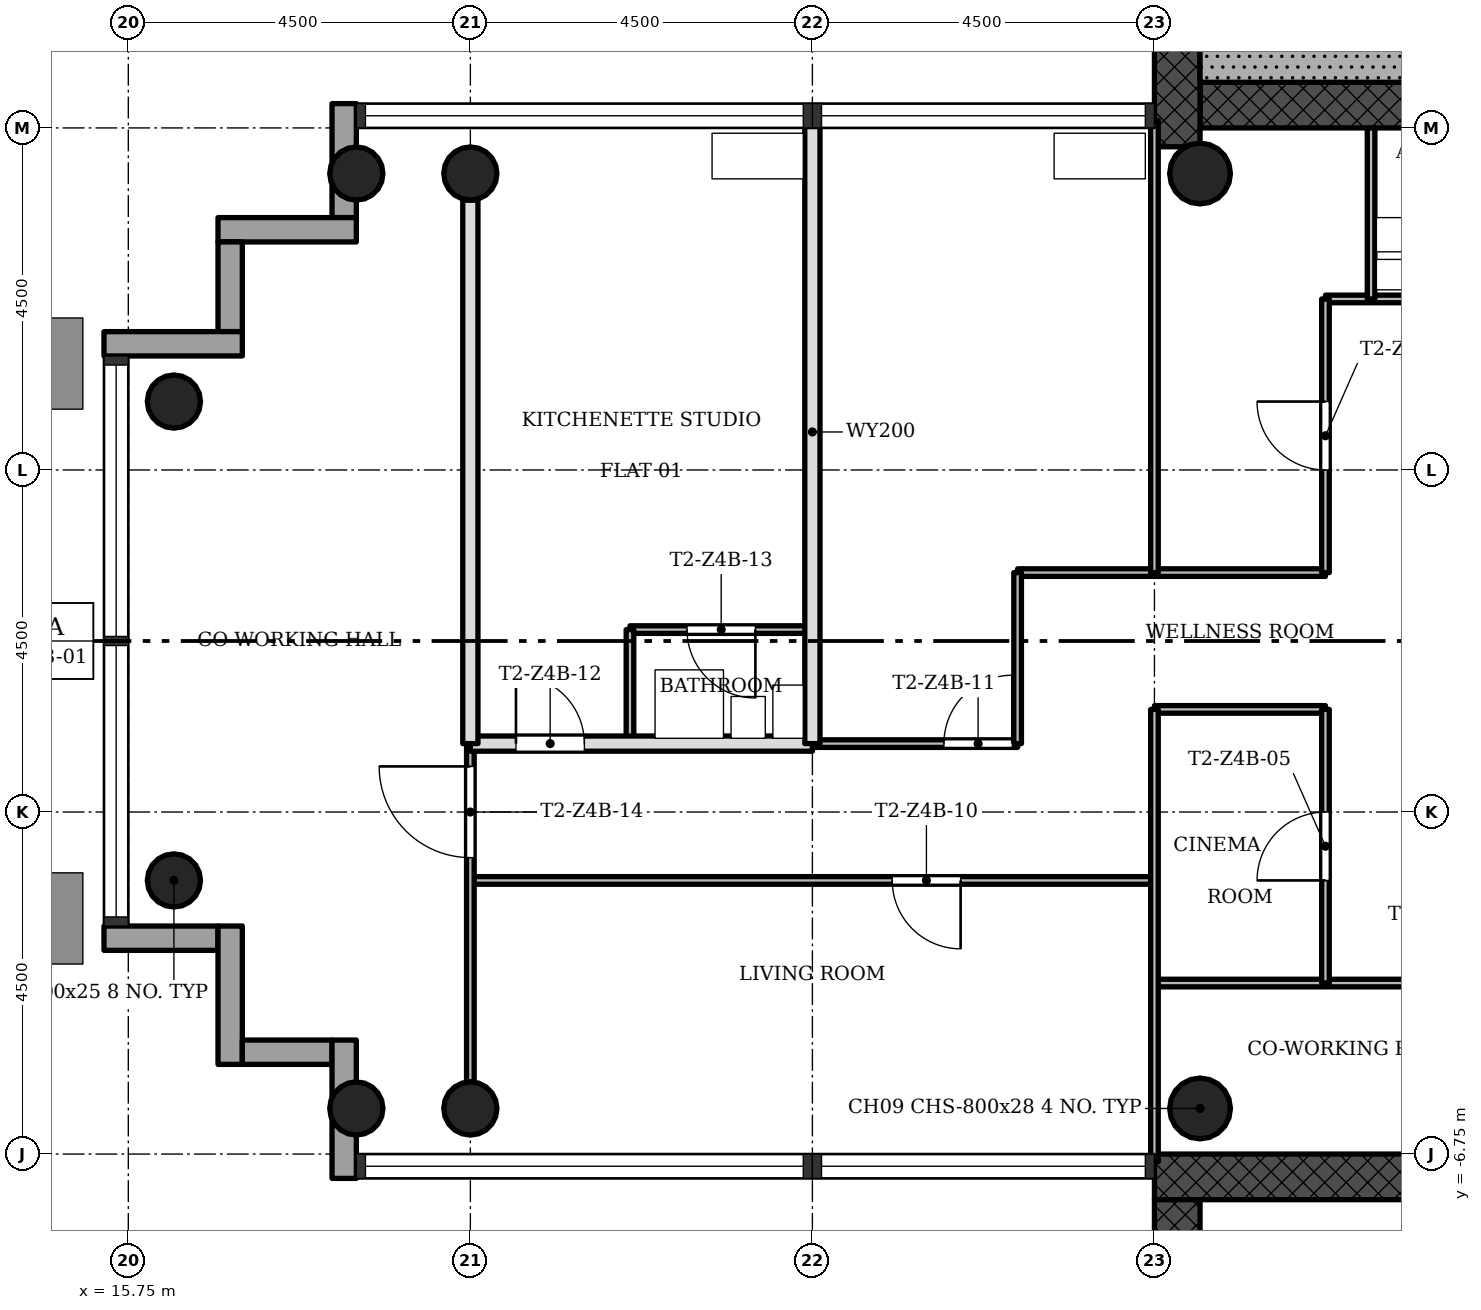
"""IFC4 building model, lengths in metres.
Left out: names, types, materials, properties, quantities, classifications, styles, units other than length and angle.
Written with IfcOpenShell. Run it as: python <this file> out.ifc"""

import sys

from ifc_helpers import new_model, si_unit, direction, frame, frame_2d, origin, origin_2d, place, context, subcontext, project, spatial, rectangle, hollow_circle, extrude, element, fill, save


model = new_model("IFC4")
c1 = context("Model", 3, precision=1e-05, world=origin(), true_north=direction((0.0, 1.0)))
c2 = subcontext(c1, "Body", "Model", "MODEL_VIEW")
j1 = project(units=[si_unit("LENGTHUNIT", "METRE"), si_unit("PLANEANGLEUNIT", "RADIAN")], contexts=[c1])
p1 = place(None, origin())
s1 = spatial("IfcSite", under=j1, at=p1, CompositionType="ELEMENT")
p2 = place(p1, origin())
s2 = spatial("IfcBuilding", under=s1, at=p2, CompositionType="ELEMENT")
p3 = place(p2, frame((0.0, 0.0, 230.0)))
s3 = spatial("IfcBuildingStorey", under=s2, at=p3, CompositionType="ELEMENT", Elevation=230.0)
p4 = place(p3, frame((29.85, 7.05, 0.0), z_axis=(0.0, 0.0, 1.0), x_axis=(1.0, 0.0, 0.0)))
e1 = element("IfcWall", 1, at=p4, inside=s3, PredefinedType="SHEAR", context=c2, shape_type="SweptSolid", body=[
    extrude(rectangle(XDim=12.9, YDim=0.6, at=frame_2d((6.45, 0.0))), origin(), (0.0, 0.0, 1.0), 3.4),
])
p5 = place(p4, frame((5.25, 0.0, 0.0)))
e2 = element("IfcOpeningElement", 2, at=p5, cuts=e1, PredefinedType="OPENING", context=c2, shape_type="SweptSolid", body=[
    extrude(rectangle(XDim=1.8, YDim=2.1, at=frame_2d((0.9, 1.05))), frame((0.0, 0.31, 0.0), z_axis=(0.0, -1.0, 0.0), x_axis=(1.0, 0.0, 0.0)), (0.0, 0.0, 1.0), 0.62),
])
p6 = place(p3, frame((29.55, 15.15, 0.0), z_axis=(0.0, 0.0, 1.0), x_axis=(0.0, -1.0, 0.0)))
e3 = element("IfcWall", 3, at=p6, inside=s3, PredefinedType="SHEAR", context=c2, shape_type="SweptSolid", body=[
    extrude(rectangle(XDim=8.648, YDim=0.6, at=frame_2d((4.324, 0.0))), origin(), (0.0, 0.0, 1.0), 3.4),
])
p7 = place(p3, frame((42.15, -7.05, 0.0), z_axis=(0.0, 0.0, 1.0), x_axis=(-1.0, 0.0, 0.0)))
e4 = element("IfcWall", 4, at=p7, inside=s3, PredefinedType="SHEAR", context=c2, shape_type="SweptSolid", body=[
    extrude(rectangle(XDim=12.9, YDim=0.6, at=frame_2d((6.45, 0.0))), origin(), (0.0, 0.0, 1.0), 3.4),
])
p8 = place(p7, frame((5.25, 0.0, 0.0)))
e5 = element("IfcOpeningElement", 5, at=p8, cuts=e4, PredefinedType="OPENING", context=c2, shape_type="SweptSolid", body=[
    extrude(rectangle(XDim=1.8, YDim=2.1, at=frame_2d((0.9, 1.05))), frame((0.0, 0.31, 0.0), z_axis=(0.0, -1.0, 0.0), x_axis=(1.0, 0.0, 0.0)), (0.0, 0.0, 1.0), 0.62),
])
p9 = place(p3, frame((29.55, -7.35, 0.0), z_axis=(0.0, 0.0, 1.0), x_axis=(0.0, -1.0, 0.0)))
e6 = element("IfcWall", 6, at=p9, inside=s3, PredefinedType="SHEAR", context=c2, shape_type="SweptSolid", body=[
    extrude(rectangle(XDim=8.4, YDim=0.6, at=frame_2d((4.2, 0.0))), origin(), (0.0, 0.0, 1.0), 3.4),
])
for number, where, z_axis, x_axis in (
    (7, (20.25, 6.15, 0.0), (0.0, 0.0, 1.0), (1.0, 0.0, 0.0)),
    (8, (20.25, -6.15, 0.0), (0.0, 0.0, 1.0), (1.0, 0.0, 0.0)),
    (9, (18.75, 6.15, 0.0), (0.0, 0.0, 1.0), (1.0, 0.0, 0.0)),
    (10, (18.75, -6.15, 0.0), (0.0, 0.0, 1.0), (1.0, 0.0, 0.0)),
    (11, (16.35, 3.15, 0.0), (0.0, 0.0, 1.0), (1.0, 0.0, 0.0)),
    (12, (16.35, -3.15, 0.0), (0.0, 0.0, 1.0), (1.0, 0.0, 0.0)),
):
    element("IfcColumn", number, at=place(p3, frame(where, z_axis=z_axis, x_axis=x_axis)), inside=s3, PredefinedType="COLUMN", context=c2, shape_type="SweptSolid", body=[
        extrude(hollow_circle(Radius=0.35, WallThickness=0.025, at=origin_2d()), origin(), (0.0, 0.0, 1.0), 3.4),
    ])
for number, where, z_axis, x_axis in (
    (13, (29.85, 6.15, 0.0), (0.0, 0.0, 1.0), (1.0, 0.0, 0.0)),
    (14, (29.85, -6.15, 0.0), (0.0, 0.0, 1.0), (1.0, 0.0, 0.0)),
):
    element("IfcColumn", number, at=place(p3, frame(where, z_axis=z_axis, x_axis=x_axis)), inside=s3, PredefinedType="COLUMN", context=c2, shape_type="SweptSolid", body=[
        extrude(hollow_circle(Radius=0.4, WallThickness=0.028, at=origin_2d()), origin(), (0.0, 0.0, 1.0), 3.4),
    ])
p10 = place(p3, frame((18.59, 7.07, -0.3), z_axis=(0.0, 0.0, 1.0), x_axis=(0.0, -1.0, 0.0)))
e15 = element("IfcWall", 15, at=p10, inside=s3, PredefinedType="STANDARD", context=c2, shape_type="SweptSolid", body=[
    extrude(rectangle(XDim=1.5, YDim=0.32, at=frame_2d((0.75, 0.0))), origin(), (0.0, 0.0, 1.0), 3.4),
])
p11 = place(p3, frame((18.75, 5.41, -0.3), z_axis=(0.0, 0.0, 1.0), x_axis=(-1.0, 0.0, 0.0)))
e16 = element("IfcWall", 16, at=p11, inside=s3, PredefinedType="STANDARD", context=c2, shape_type="SweptSolid", body=[
    extrude(rectangle(XDim=1.82, YDim=0.32, at=frame_2d((0.91, 0.0))), origin(), (0.0, 0.0, 1.0), 3.4),
])
p12 = place(p3, frame((17.09, 5.25, -0.3), z_axis=(0.0, 0.0, 1.0), x_axis=(0.0, -1.0, 0.0)))
e17 = element("IfcWall", 17, at=p12, inside=s3, PredefinedType="STANDARD", context=c2, shape_type="SweptSolid", body=[
    extrude(rectangle(XDim=1.18, YDim=0.32, at=frame_2d((0.59, 0.0))), origin(), (0.0, 0.0, 1.0), 3.4),
])
p13 = place(p3, frame((17.25, 3.91, -0.3), z_axis=(0.0, 0.0, 1.0), x_axis=(-1.0, 0.0, 0.0)))
e18 = element("IfcWall", 18, at=p13, inside=s3, PredefinedType="STANDARD", context=c2, shape_type="SweptSolid", body=[
    extrude(rectangle(XDim=1.82, YDim=0.32, at=frame_2d((0.91, 0.0))), origin(), (0.0, 0.0, 1.0), 3.4),
])
p14 = place(p3, frame((15.43, -3.91, -0.3), z_axis=(0.0, 0.0, 1.0), x_axis=(1.0, 0.0, 0.0)))
e19 = element("IfcWall", 19, at=p14, inside=s3, PredefinedType="STANDARD", context=c2, shape_type="SweptSolid", body=[
    extrude(rectangle(XDim=1.5, YDim=0.32, at=frame_2d((0.75, 0.0))), origin(), (0.0, 0.0, 1.0), 3.4),
])
p15 = place(p3, frame((17.09, -3.75, -0.3), z_axis=(0.0, 0.0, 1.0), x_axis=(0.0, -1.0, 0.0)))
e20 = element("IfcWall", 20, at=p15, inside=s3, PredefinedType="STANDARD", context=c2, shape_type="SweptSolid", body=[
    extrude(rectangle(XDim=1.82, YDim=0.32, at=frame_2d((0.91, 0.0))), origin(), (0.0, 0.0, 1.0), 3.4),
])
p16 = place(p3, frame((17.25, -5.41, -0.3), z_axis=(0.0, 0.0, 1.0), x_axis=(1.0, 0.0, 0.0)))
e21 = element("IfcWall", 21, at=p16, inside=s3, PredefinedType="STANDARD", context=c2, shape_type="SweptSolid", body=[
    extrude(rectangle(XDim=1.18, YDim=0.32, at=frame_2d((0.59, 0.0))), origin(), (0.0, 0.0, 1.0), 3.4),
])
p17 = place(p3, frame((18.59, -5.25, -0.3), z_axis=(0.0, 0.0, 1.0), x_axis=(0.0, -1.0, 0.0)))
e22 = element("IfcWall", 22, at=p17, inside=s3, PredefinedType="STANDARD", context=c2, shape_type="SweptSolid", body=[
    extrude(rectangle(XDim=1.82, YDim=0.32, at=frame_2d((0.91, 0.0))), origin(), (0.0, 0.0, 1.0), 3.4),
])
p18 = place(p3, frame((34.5, -4.5, 0.0), z_axis=(0.0, 0.0, 1.0), x_axis=(-1.0, 0.0, 0.0)))
e23 = element("IfcWall", 23, at=p18, inside=s3, PredefinedType="PARTITIONING", context=c2, shape_type="SweptSolid", body=[
    extrude(rectangle(XDim=5.25, YDim=0.1, at=frame_2d((2.625, 0.0))), origin(), (0.0, 0.0, 1.0), 2.98),
])
p19 = place(p18, frame((1.05, 0.0, 0.0)))
e24 = element("IfcOpeningElement", 24, at=p19, cuts=e23, PredefinedType="OPENING", context=c2, shape_type="SweptSolid", body=[
    extrude(rectangle(XDim=0.9, YDim=2.1, at=frame_2d((0.45, 1.05))), frame((0.0, 0.06, 0.0), z_axis=(0.0, -1.0, 0.0), x_axis=(1.0, 0.0, 0.0)), (0.0, 0.0, 1.0), 0.12),
])
p20 = place(p3, frame((29.25, -3.15, 0.0), z_axis=(0.0, 0.0, 1.0), x_axis=(-1.0, 0.0, 0.0)))
e25 = element("IfcWall", 25, at=p20, inside=s3, PredefinedType="PARTITIONING", context=c2, shape_type="SweptSolid", body=[
    extrude(rectangle(XDim=9.0, YDim=0.1, at=frame_2d((4.5, 0.0))), origin(), (0.0, 0.0, 1.0), 2.98),
])
p21 = place(p20, frame((2.55, 0.0, 0.0)))
e26 = element("IfcOpeningElement", 26, at=p21, cuts=e25, PredefinedType="OPENING", context=c2, shape_type="SweptSolid", body=[
    extrude(rectangle(XDim=0.9, YDim=2.1, at=frame_2d((0.45, 1.05))), frame((0.0, 0.06, 0.0), z_axis=(0.0, -1.0, 0.0), x_axis=(1.0, 0.0, 0.0)), (0.0, 0.0, 1.0), 0.12),
])
p22 = place(p3, frame((27.45, -1.35, 0.0), z_axis=(0.0, 0.0, 1.0), x_axis=(-1.0, 0.0, 0.0)))
e27 = element("IfcWall", 27, at=p22, inside=s3, PredefinedType="PARTITIONING", context=c2, shape_type="SweptSolid", body=[
    extrude(rectangle(XDim=2.7, YDim=0.1, at=frame_2d((1.35, 0.0))), origin(), (0.0, 0.0, 1.0), 2.98),
])
p23 = place(p22, frame((0.07, 0.0, 0.0)))
e28 = element("IfcOpeningElement", 28, at=p23, cuts=e27, PredefinedType="OPENING", context=c2, shape_type="SweptSolid", body=[
    extrude(rectangle(XDim=0.9, YDim=2.1, at=frame_2d((0.45, 1.05))), frame((0.0, 0.06, 0.0), z_axis=(0.0, -1.0, 0.0), x_axis=(1.0, 0.0, 0.0)), (0.0, 0.0, 1.0), 0.12),
])
p24 = place(p3, frame((24.75, -1.35, 0.0), z_axis=(0.0, 0.0, 1.0), x_axis=(-1.0, 0.0, 0.0)))
e29 = element("IfcWall", 29, at=p24, inside=s3, PredefinedType="SOLIDWALL", context=c2, shape_type="SweptSolid", body=[
    extrude(rectangle(XDim=4.5, YDim=0.2, at=frame_2d((2.25, 0.0))), origin(), (0.0, 0.0, 1.0), 2.98),
])
p25 = place(p24, frame((3.0, 0.0, 0.0)))
e30 = element("IfcOpeningElement", 30, at=p25, cuts=e29, PredefinedType="OPENING", context=c2, shape_type="SweptSolid", body=[
    extrude(rectangle(XDim=0.9, YDim=2.1, at=frame_2d((0.45, 1.05))), frame((0.0, 0.11, 0.0), z_axis=(0.0, -1.0, 0.0), x_axis=(1.0, 0.0, 0.0)), (0.0, 0.0, 1.0), 0.22),
])
p26 = place(p3, frame((31.5, -0.9, 0.0), z_axis=(0.0, 0.0, 1.0), x_axis=(-1.0, 0.0, 0.0)))
e31 = element("IfcWall", 31, at=p26, inside=s3, PredefinedType="PARTITIONING", context=c2, shape_type="SweptSolid", body=[
    extrude(rectangle(XDim=2.25, YDim=0.1, at=frame_2d((1.125, 0.0))), origin(), (0.0, 0.0, 1.0), 2.98),
])
p27 = place(p3, frame((24.75, 0.15, 0.0), z_axis=(0.0, 0.0, 1.0), x_axis=(-1.0, 0.0, 0.0)))
e32 = element("IfcWall", 32, at=p27, inside=s3, PredefinedType="PARTITIONING", context=c2, shape_type="SweptSolid", body=[
    extrude(rectangle(XDim=2.4, YDim=0.1, at=frame_2d((1.2, 0.0))), origin(), (0.0, 0.0, 1.0), 2.98),
])
p28 = place(p27, frame((0.75, 0.0, 0.0)))
e33 = element("IfcOpeningElement", 33, at=p28, cuts=e32, PredefinedType="OPENING", context=c2, shape_type="SweptSolid", body=[
    extrude(rectangle(XDim=0.9, YDim=2.1, at=frame_2d((0.45, 1.05))), frame((0.0, 0.06, 0.0), z_axis=(0.0, -1.0, 0.0), x_axis=(1.0, 0.0, 0.0)), (0.0, 0.0, 1.0), 0.12),
])
p29 = place(p3, frame((31.5, 0.9, 0.0), z_axis=(0.0, 0.0, 1.0), x_axis=(-1.0, 0.0, 0.0)))
e34 = element("IfcWall", 34, at=p29, inside=s3, PredefinedType="PARTITIONING", context=c2, shape_type="SweptSolid", body=[
    extrude(rectangle(XDim=4.05, YDim=0.1, at=frame_2d((2.025, 0.0))), origin(), (0.0, 0.0, 1.0), 2.98),
])
p30 = place(p3, frame((34.5, 4.5, 0.0), z_axis=(0.0, 0.0, 1.0), x_axis=(-1.0, 0.0, 0.0)))
e35 = element("IfcWall", 35, at=p30, inside=s3, PredefinedType="PARTITIONING", context=c2, shape_type="SweptSolid", body=[
    extrude(rectangle(XDim=3.0, YDim=0.1, at=frame_2d((1.5, 0.0))), origin(), (0.0, 0.0, 1.0), 2.98),
])
p31 = place(p3, frame((32.1, 4.5, 0.0), z_axis=(0.0, 0.0, 1.0), x_axis=(0.0, 1.0, 0.0)))
e36 = element("IfcWall", 36, at=p31, inside=s3, PredefinedType="PARTITIONING", context=c2, shape_type="SweptSolid", body=[
    extrude(rectangle(XDim=2.25, YDim=0.1, at=frame_2d((1.125, 0.0))), origin(), (0.0, 0.0, 1.0), 2.98),
])
p32 = place(p3, frame((31.5, -4.5, 0.0), z_axis=(0.0, 0.0, 1.0), x_axis=(0.0, 1.0, 0.0)))
e37 = element("IfcWall", 37, at=p32, inside=s3, PredefinedType="PARTITIONING", context=c2, shape_type="SweptSolid", body=[
    extrude(rectangle(XDim=3.6, YDim=0.1, at=frame_2d((1.8, 0.0))), origin(), (0.0, 0.0, 1.0), 2.98),
])
p33 = place(p32, frame((1.35, 0.0, 0.0)))
e38 = element("IfcOpeningElement", 38, at=p33, cuts=e37, PredefinedType="OPENING", context=c2, shape_type="SweptSolid", body=[
    extrude(rectangle(XDim=0.9, YDim=2.1, at=frame_2d((0.45, 1.05))), frame((0.0, 0.06, 0.0), z_axis=(0.0, -1.0, 0.0), x_axis=(1.0, 0.0, 0.0)), (0.0, 0.0, 1.0), 0.12),
])
p34 = place(p3, frame((31.5, 0.9, 0.0), z_axis=(0.0, 0.0, 1.0), x_axis=(0.0, 1.0, 0.0)))
e39 = element("IfcWall", 39, at=p34, inside=s3, PredefinedType="PARTITIONING", context=c2, shape_type="SweptSolid", body=[
    extrude(rectangle(XDim=3.6, YDim=0.1, at=frame_2d((1.8, 0.0))), origin(), (0.0, 0.0, 1.0), 2.98),
])
p35 = place(p34, frame((1.35, 0.0, 0.0)))
e40 = element("IfcOpeningElement", 40, at=p35, cuts=e39, PredefinedType="OPENING", context=c2, shape_type="SweptSolid", body=[
    extrude(rectangle(XDim=0.9, YDim=2.1, at=frame_2d((0.45, 1.05))), frame((0.0, 0.06, 0.0), z_axis=(0.0, -1.0, 0.0), x_axis=(1.0, 0.0, 0.0)), (0.0, 0.0, 1.0), 0.12),
])
for number, where, z_axis, x_axis in (
    (41, (29.25, -6.85, 0.0), (0.0, 0.0, 1.0), (0.0, 1.0, 0.0)),
    (42, (29.25, 0.9, 0.0), (0.0, 0.0, 1.0), (0.0, 1.0, 0.0)),
):
    element("IfcWall", number, at=place(p3, frame(where, z_axis=z_axis, x_axis=x_axis)), inside=s3, PredefinedType="PARTITIONING", context=c2, shape_type="SweptSolid", body=[
        extrude(rectangle(XDim=5.95, YDim=0.1, at=frame_2d((2.975, 0.0))), origin(), (0.0, 0.0, 1.0), 2.98),
    ])
p36 = place(p3, frame((27.45, -1.35, 0.0), z_axis=(0.0, 0.0, 1.0), x_axis=(0.0, 1.0, 0.0)))
e43 = element("IfcWall", 43, at=p36, inside=s3, PredefinedType="PARTITIONING", context=c2, shape_type="SweptSolid", body=[
    extrude(rectangle(XDim=2.25, YDim=0.1, at=frame_2d((1.125, 0.0))), origin(), (0.0, 0.0, 1.0), 2.98),
])
p37 = place(p3, frame((24.75, -1.35, 0.0), z_axis=(0.0, 0.0, 1.0), x_axis=(0.0, 1.0, 0.0)))
e44 = element("IfcWall", 44, at=p37, inside=s3, PredefinedType="SOLIDWALL", context=c2, shape_type="SweptSolid", body=[
    extrude(rectangle(XDim=8.2, YDim=0.2, at=frame_2d((4.1, 0.0))), origin(), (0.0, 0.0, 1.0), 2.98),
])
p38 = place(p3, frame((22.35, -1.35, 0.0), z_axis=(0.0, 0.0, 1.0), x_axis=(0.0, 1.0, 0.0)))
e45 = element("IfcWall", 45, at=p38, inside=s3, PredefinedType="PARTITIONING", context=c2, shape_type="SweptSolid", body=[
    extrude(rectangle(XDim=1.5, YDim=0.1, at=frame_2d((0.75, 0.0))), origin(), (0.0, 0.0, 1.0), 2.98),
])
p39 = place(p3, frame((20.25, -5.8, 0.0), z_axis=(0.0, 0.0, 1.0), x_axis=(0.0, 1.0, 0.0)))
e46 = element("IfcWall", 46, at=p39, inside=s3, PredefinedType="PARTITIONING", context=c2, shape_type="SweptSolid", body=[
    extrude(rectangle(XDim=4.45, YDim=0.1, at=frame_2d((2.225, 0.0))), origin(), (0.0, 0.0, 1.0), 2.98),
])
p40 = place(p39, frame((2.95, 0.0, 0.0)))
e47 = element("IfcOpeningElement", 47, at=p40, cuts=e46, PredefinedType="OPENING", context=c2, shape_type="SweptSolid", body=[
    extrude(rectangle(XDim=1.2, YDim=2.1, at=frame_2d((0.6, 1.05))), frame((0.0, 0.06, 0.0), z_axis=(0.0, -1.0, 0.0), x_axis=(1.0, 0.0, 0.0)), (0.0, 0.0, 1.0), 0.12),
])
p41 = place(p3, frame((20.25, -1.35, 0.0), z_axis=(0.0, 0.0, 1.0), x_axis=(0.0, 1.0, 0.0)))
e48 = element("IfcWall", 48, at=p41, inside=s3, PredefinedType="SOLIDWALL", context=c2, shape_type="SweptSolid", body=[
    extrude(rectangle(XDim=7.15, YDim=0.2, at=frame_2d((3.575, 0.0))), origin(), (0.0, 0.0, 1.0), 2.98),
])
p42 = place(p3, frame((34.15, 7.65, 0.0), z_axis=(0.0, 0.0, 1.0), x_axis=(-1.0, 0.0, 0.0)))
e49 = element("IfcWall", 49, at=p42, inside=s3, PredefinedType="SHEAR", context=c2, shape_type="SweptSolid", body=[
    extrude(rectangle(XDim=4.3, YDim=0.6, at=frame_2d((2.15, 0.0))), origin(), (0.0, 0.0, 1.0), 3.4),
])
p43 = place(p35, origin())
e50 = element("IfcDoor", 50, at=p43, inside=s3, OperationType="SINGLE_SWING_LEFT", PredefinedType="DOOR", context=c2, shape_type="SweptSolid", body=[
    extrude(rectangle(XDim=0.9, YDim=2.1, at=frame_2d((0.45, 1.05))), frame((0.0, 0.025, 0.0), z_axis=(0.0, -1.0, 0.0), x_axis=(1.0, 0.0, 0.0)), (0.0, 0.0, 1.0), 0.05),
])
fill(e40, e50)
p44 = place(p33, origin())
e51 = element("IfcDoor", 51, at=p44, inside=s3, OperationType="SINGLE_SWING_RIGHT", PredefinedType="DOOR", context=c2, shape_type="SweptSolid", body=[
    extrude(rectangle(XDim=0.9, YDim=2.1, at=frame_2d((0.45, 1.05))), frame((0.0, 0.025, 0.0), z_axis=(0.0, -1.0, 0.0), x_axis=(1.0, 0.0, 0.0)), (0.0, 0.0, 1.0), 0.05),
])
fill(e38, e51)
p45 = place(p21, origin())
e52 = element("IfcDoor", 52, at=p45, inside=s3, OperationType="SINGLE_SWING_RIGHT", PredefinedType="DOOR", context=c2, shape_type="SweptSolid", body=[
    extrude(rectangle(XDim=0.9, YDim=2.1, at=frame_2d((0.45, 1.05))), frame((0.0, 0.025, 0.0), z_axis=(0.0, -1.0, 0.0), x_axis=(1.0, 0.0, 0.0)), (0.0, 0.0, 1.0), 0.05),
])
fill(e26, e52)
p46 = place(p23, origin())
e53 = element("IfcDoor", 53, at=p46, inside=s3, OperationType="SINGLE_SWING_LEFT", PredefinedType="DOOR", context=c2, shape_type="SweptSolid", body=[
    extrude(rectangle(XDim=0.9, YDim=2.1, at=frame_2d((0.45, 1.05))), frame((0.0, 0.025, 0.0), z_axis=(0.0, -1.0, 0.0), x_axis=(1.0, 0.0, 0.0)), (0.0, 0.0, 1.0), 0.05),
])
fill(e28, e53)
p47 = place(p25, origin())
e54 = element("IfcDoor", 54, at=p47, inside=s3, OperationType="SINGLE_SWING_RIGHT", PredefinedType="DOOR", context=c2, shape_type="SweptSolid", body=[
    extrude(rectangle(XDim=0.9, YDim=2.1, at=frame_2d((0.45, 1.05))), frame((0.0, 0.025, 0.0), z_axis=(0.0, -1.0, 0.0), x_axis=(1.0, 0.0, 0.0)), (0.0, 0.0, 1.0), 0.05),
])
fill(e30, e54)
p48 = place(p28, origin())
e55 = element("IfcDoor", 55, at=p48, inside=s3, OperationType="SINGLE_SWING_RIGHT", PredefinedType="DOOR", context=c2, shape_type="SweptSolid", body=[
    extrude(rectangle(XDim=0.9, YDim=2.1, at=frame_2d((0.45, 1.05))), frame((0.0, 0.025, 0.0), z_axis=(0.0, -1.0, 0.0), x_axis=(1.0, 0.0, 0.0)), (0.0, 0.0, 1.0), 0.05),
])
fill(e33, e55)
p49 = place(p40, origin())
e56 = element("IfcDoor", 56, at=p49, inside=s3, OperationType="SINGLE_SWING_LEFT", PredefinedType="DOOR", context=c2, shape_type="SweptSolid", body=[
    extrude(rectangle(XDim=1.2, YDim=2.1, at=frame_2d((0.6, 1.05))), frame((0.0, 0.025, 0.0), z_axis=(0.0, -1.0, 0.0), x_axis=(1.0, 0.0, 0.0)), (0.0, 0.0, 1.0), 0.05),
])
fill(e47, e56)
save(model, sys.argv[1])
